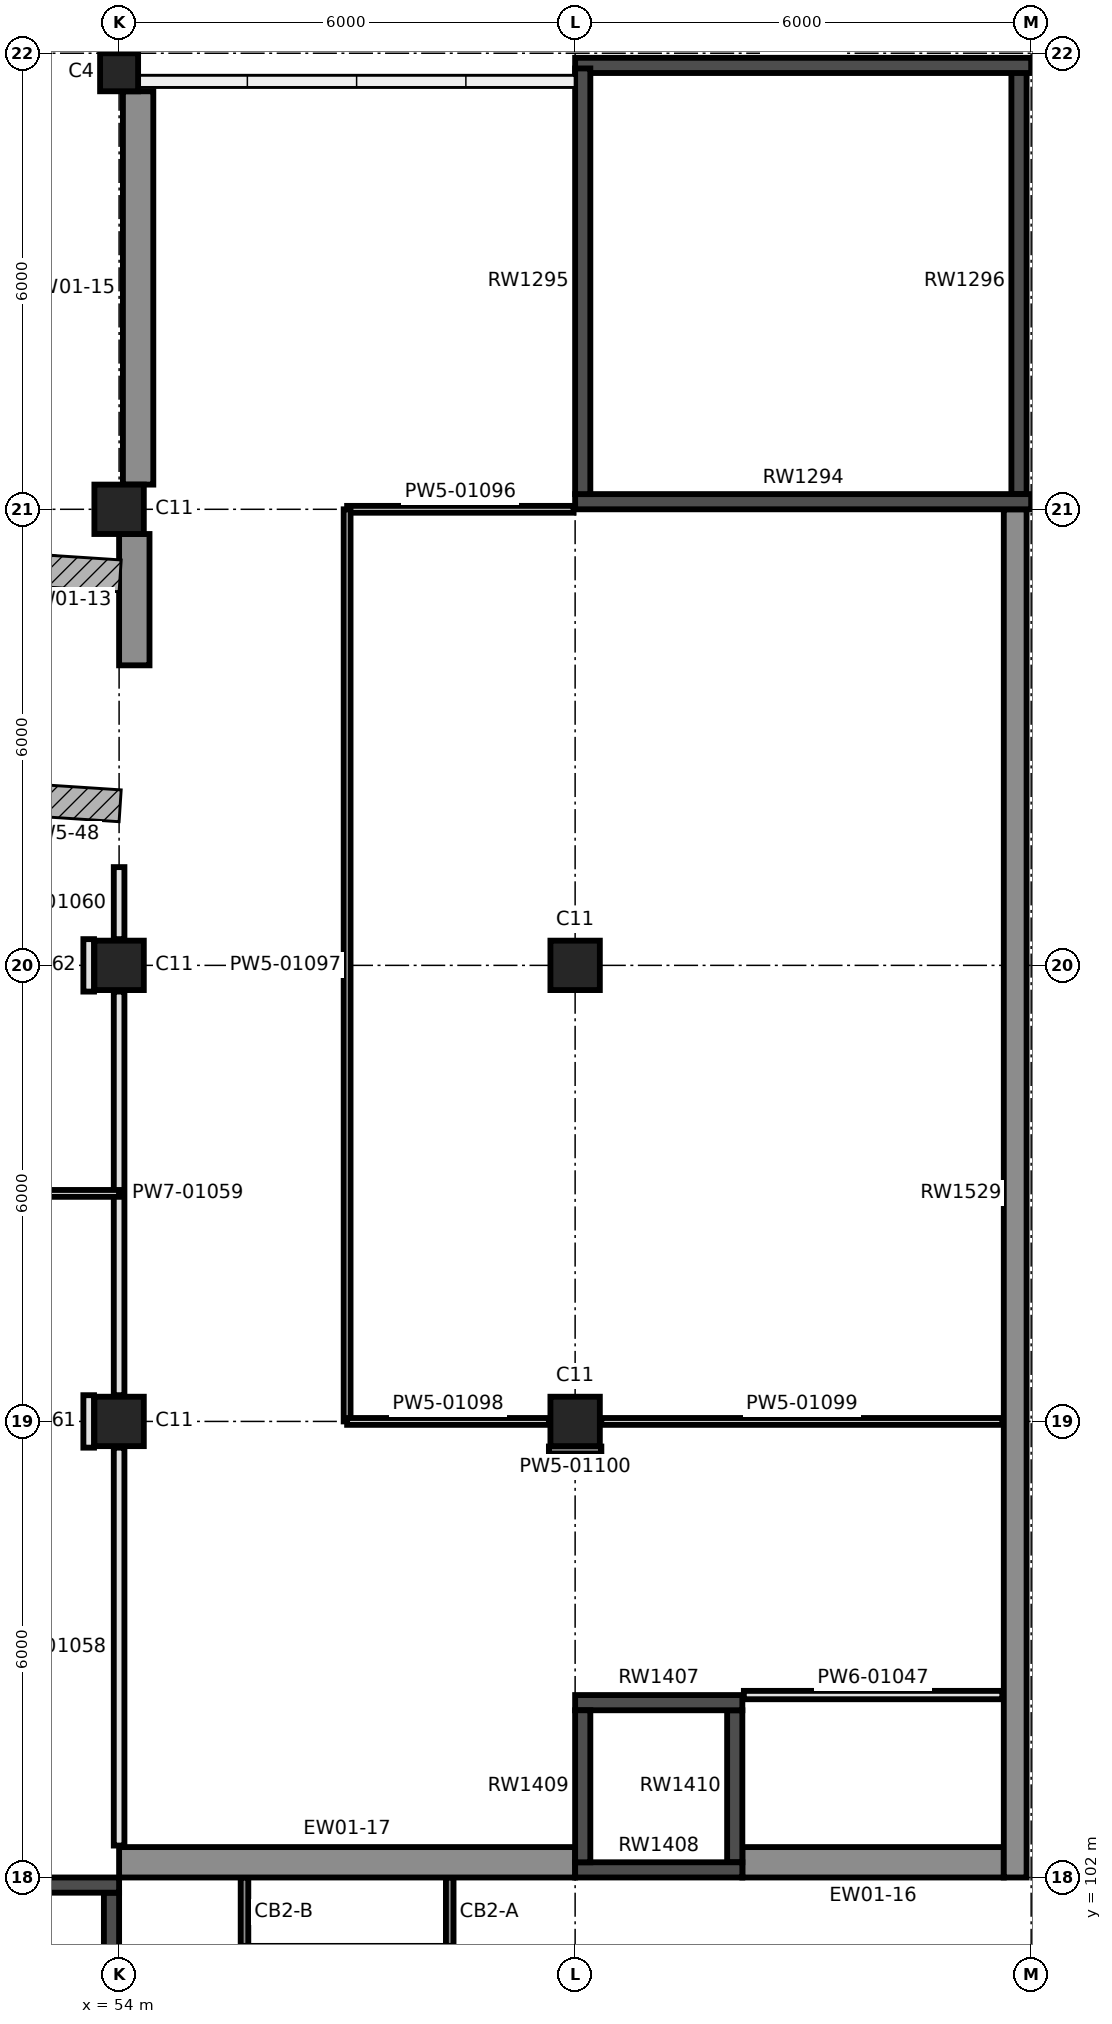
"""IFC4 building model, lengths in metres.
Left out: names, types, materials, properties, quantities, classifications, styles, units other than length and angle.
Written with IfcOpenShell. Run it as: python <this file> out.ifc"""

import sys

from ifc_helpers import new_model, si_unit, direction, frame, frame_2d, origin, origin_2d, place, context, subcontext, project, spatial, polyline, rectangle, outline, extrude, element, fill, save


model = new_model("IFC4")
c1 = context("Model", 3, precision=1e-05, world=origin(), true_north=direction((0.0, 1.0)))
c2 = subcontext(c1, "Body", "Model", "MODEL_VIEW")
j1 = project(units=[si_unit("LENGTHUNIT", "METRE"), si_unit("PLANEANGLEUNIT", "RADIAN")], contexts=[c1])
p1 = place(None, origin())
s1 = spatial("IfcSite", under=j1, at=p1, CompositionType="ELEMENT")
p2 = place(p1, origin())
s2 = spatial("IfcBuilding", under=s1, at=p2, CompositionType="ELEMENT")
p3 = place(p2, frame((0.0, 0.0, 7.0)))
s3 = spatial("IfcBuildingStorey", under=s2, at=p3, CompositionType="ELEMENT", Elevation=7.0)
for number, where, z_axis, x_axis in (
    (1, (54.0, 108.0, 0.0), (0.0, 0.0, 1.0), (1.0, 0.0, 0.0)),
    (2, (60.0, 108.0, 0.0), (0.0, 0.0, 1.0), (1.0, 0.0, 0.0)),
    (3, (54.0, 114.0, 0.0), (0.0, 0.0, 1.0), (1.0, 0.0, 0.0)),
    (4, (60.0, 114.0, 0.0), (0.0, 0.0, 1.0), (1.0, 0.0, 0.0)),
    (5, (54.0, 120.0, 0.0), (0.0, 0.0, 1.0), (1.0, 0.0, 0.0)),
):
    element("IfcColumn", number, at=place(p3, frame(where, z_axis=z_axis, x_axis=x_axis)), inside=s3, PredefinedType="COLUMN", context=c2, shape_type="SweptSolid", body=[
        extrude(rectangle(XDim=0.65, YDim=0.65, at=origin_2d()), origin(), (0.0, 0.0, 1.0), 5.0),
    ])
p4 = place(p3, frame((54.0, 125.75, 0.0), z_axis=(0.0, 0.0, 1.0), x_axis=(1.0, 0.0, 0.0)))
e6 = element("IfcColumn", 6, at=p4, inside=s3, PredefinedType="COLUMN", context=c2, shape_type="SweptSolid", body=[
    extrude(rectangle(XDim=0.5, YDim=0.5, at=origin_2d()), origin(), (0.0, 0.0, 1.0), 5.0),
])
p5 = place(p3, frame((48.0, 101.9, 0.0), z_axis=(0.0, 0.0, 1.0), x_axis=(1.0, 0.0, 0.0)))
e7 = element("IfcWall", 7, at=p5, inside=s3, PredefinedType="SHEAR", context=c2, shape_type="SweptSolid", body=[
    extrude(rectangle(XDim=6.0, YDim=0.2, at=frame_2d((3.0, 0.0))), origin(), (0.0, 0.0, 1.0), 5.0),
])
p6 = place(p5, frame((2.1, 0.0, 0.0)))
e8 = element("IfcOpeningElement", 8, at=p6, cuts=e7, PredefinedType="OPENING", context=c2, shape_type="SweptSolid", body=[
    extrude(rectangle(XDim=1.8, YDim=2.2, at=frame_2d((0.9, 1.1))), frame((0.0, 0.11, 0.0), z_axis=(0.0, -1.0, 0.0), x_axis=(1.0, 0.0, 0.0)), (0.0, 0.0, 1.0), 0.22),
])
p7 = place(p3, frame((53.9, 96.2, 0.0), z_axis=(0.0, 0.0, 1.0), x_axis=(0.0, 1.0, 0.0)))
e9 = element("IfcWall", 9, at=p7, inside=s3, PredefinedType="SHEAR", context=c2, shape_type="SweptSolid", body=[
    extrude(rectangle(XDim=5.6, YDim=0.2, at=frame_2d((2.8, 0.0))), origin(), (0.0, 0.0, 1.0), 5.0),
])
p8 = place(p7, frame((2.55, 0.0, 0.9)))
e10 = element("IfcOpeningElement", 10, at=p8, cuts=e9, PredefinedType="OPENING", context=c2, shape_type="SweptSolid", body=[
    extrude(rectangle(XDim=0.5, YDim=2.1, at=frame_2d((0.25, 1.05))), frame((0.0, 0.11, 0.0), z_axis=(0.0, -1.0, 0.0), x_axis=(1.0, 0.0, 0.0)), (0.0, 0.0, 1.0), 0.22),
])
for number, where, z_axis, x_axis in (
    (11, (60.0, 125.84, 0.0), (0.0, 0.0, 1.0), (1.0, 0.0, 0.0)),
    (12, (60.0, 120.1, 0.0), (0.0, 0.0, 1.0), (1.0, 0.0, 0.0)),
):
    element("IfcWall", number, at=place(p3, frame(where, z_axis=z_axis, x_axis=x_axis)), inside=s3, PredefinedType="SHEAR", context=c2, shape_type="SweptSolid", body=[
        extrude(rectangle(XDim=6.0, YDim=0.2, at=frame_2d((3.0, 0.0))), origin(), (0.0, 0.0, 1.0), 5.0),
    ])
p9 = place(p3, frame((60.1, 120.2, 0.0), z_axis=(0.0, 0.0, 1.0), x_axis=(0.0, 1.0, 0.0)))
e13 = element("IfcWall", 13, at=p9, inside=s3, PredefinedType="SHEAR", context=c2, shape_type="SweptSolid", body=[
    extrude(rectangle(XDim=5.6, YDim=0.2, at=frame_2d((2.8, 0.0))), origin(), (0.0, 0.0, 1.0), 5.0),
])
p10 = place(p9, frame((4.4, 0.0, 0.0)))
e14 = element("IfcOpeningElement", 14, at=p10, cuts=e13, PredefinedType="OPENING", context=c2, shape_type="SweptSolid", body=[
    extrude(rectangle(XDim=1.1, YDim=2.2, at=frame_2d((0.55, 1.1))), frame((0.0, 0.11, 0.0), z_axis=(0.0, -1.0, 0.0), x_axis=(1.0, 0.0, 0.0)), (0.0, 0.0, 1.0), 0.22),
])
p11 = place(p3, frame((65.84, 120.2, 0.0), z_axis=(0.0, 0.0, 1.0), x_axis=(0.0, 1.0, 0.0)))
e15 = element("IfcWall", 15, at=p11, inside=s3, PredefinedType="SHEAR", context=c2, shape_type="SweptSolid", body=[
    extrude(rectangle(XDim=5.6, YDim=0.2, at=frame_2d((2.8, 0.0))), origin(), (0.0, 0.0, 1.0), 5.0),
])
p12 = place(p11, frame((2.55, 0.0, 0.9)))
e16 = element("IfcOpeningElement", 16, at=p12, cuts=e15, PredefinedType="OPENING", context=c2, shape_type="SweptSolid", body=[
    extrude(rectangle(XDim=0.5, YDim=2.1, at=frame_2d((0.25, 1.05))), frame((0.0, 0.11, 0.0), z_axis=(0.0, -1.0, 0.0), x_axis=(1.0, 0.0, 0.0)), (0.0, 0.0, 1.0), 0.22),
])
p13 = place(p3, frame((60.0, 104.3, 0.0), z_axis=(0.0, 0.0, 1.0), x_axis=(1.0, 0.0, 0.0)))
e17 = element("IfcWall", 17, at=p13, inside=s3, PredefinedType="SHEAR", context=c2, shape_type="SweptSolid", body=[
    extrude(rectangle(XDim=2.2, YDim=0.2, at=frame_2d((1.1, 0.0))), origin(), (0.0, 0.0, 1.0), 5.0),
])
p14 = place(p13, frame((0.55, 0.0, 0.0)))
e18 = element("IfcOpeningElement", 18, at=p14, cuts=e17, PredefinedType="OPENING", context=c2, shape_type="SweptSolid", body=[
    extrude(rectangle(XDim=1.1, YDim=2.1, at=frame_2d((0.55, 1.05))), frame((0.0, 0.11, 0.0), z_axis=(0.0, -1.0, 0.0), x_axis=(1.0, 0.0, 0.0)), (0.0, 0.0, 1.0), 0.22),
])
p15 = place(p3, frame((60.0, 102.1, 0.0), z_axis=(0.0, 0.0, 1.0), x_axis=(1.0, 0.0, 0.0)))
e19 = element("IfcWall", 19, at=p15, inside=s3, PredefinedType="SHEAR", context=c2, shape_type="SweptSolid", body=[
    extrude(rectangle(XDim=2.2, YDim=0.2, at=frame_2d((1.1, 0.0))), origin(), (0.0, 0.0, 1.0), 5.0),
])
for number, where, z_axis, x_axis in (
    (20, (60.1, 102.2, 0.0), (0.0, 0.0, 1.0), (0.0, 1.0, 0.0)),
    (21, (62.1, 102.2, 0.0), (0.0, 0.0, 1.0), (0.0, 1.0, 0.0)),
):
    element("IfcWall", number, at=place(p3, frame(where, z_axis=z_axis, x_axis=x_axis)), inside=s3, PredefinedType="SHEAR", context=c2, shape_type="SweptSolid", body=[
        extrude(rectangle(XDim=2.0, YDim=0.2, at=frame_2d((1.0, 0.0))), origin(), (0.0, 0.0, 1.0), 5.0),
    ])
p16 = place(p3, frame((65.79, 102.0, 0.0), z_axis=(0.0, 0.0, 1.0), x_axis=(0.0, 1.0, 0.0)))
e22 = element("IfcWall", 22, at=p16, inside=s3, PredefinedType="SOLIDWALL", context=c2, shape_type="SweptSolid", body=[
    extrude(rectangle(XDim=18.0, YDim=0.3, at=frame_2d((9.0, 0.0))), origin(), (0.0, 0.0, 1.0), 5.0),
])
p17 = place(p3, frame((54.0, 115.89, 0.0), z_axis=(-0.054899407289, -0.836965590728, 0.544494862249), x_axis=(-0.997853997628, 0.065478224383, 3.9353391e-05)))
e23 = element("IfcWall", 23, at=p17, inside=s3, PredefinedType="SOLIDWALL", context=c2, shape_type="SweptSolid", body=[
    extrude(outline(polyline([(0.0, 0.0), (1.322, 0.0), (1.125, -5.544), (0.198, -5.544), (0.0, 0.0)])), origin(), (-7.539e-05, 0.544, 0.839), 0.596),
])
p18 = place(p3, frame((54.2, 117.947, 0.0), z_axis=(0.0, 0.0, 1.0), x_axis=(0.0, 1.0, 0.0)))
e24 = element("IfcWall", 24, at=p18, inside=s3, PredefinedType="SOLIDWALL", context=c2, shape_type="SweptSolid", body=[
    extrude(rectangle(XDim=1.728, YDim=0.4, at=frame_2d((0.864, 0.0))), origin(), (0.0, 0.0, 1.0), 4.05),
])
p19 = place(p3, frame((54.25, 120.325, 0.0), z_axis=(0.0, 0.0, 1.0), x_axis=(0.0, 1.0, 0.0)))
e25 = element("IfcWall", 25, at=p19, inside=s3, PredefinedType="SOLIDWALL", context=c2, shape_type="SweptSolid", body=[
    extrude(rectangle(XDim=5.175, YDim=0.4, at=frame_2d((2.587, 0.0))), origin(), (0.0, 0.0, 1.0), 3.95),
])
p20 = place(p3, frame((65.64, 102.2, 0.0), z_axis=(0.0, 0.0, 1.0), x_axis=(-1.0, 0.0, 0.0)))
e26 = element("IfcWall", 26, at=p20, inside=s3, PredefinedType="SOLIDWALL", context=c2, shape_type="SweptSolid", body=[
    extrude(rectangle(XDim=3.44, YDim=0.4, at=frame_2d((1.72, 0.0))), origin(), (0.0, 0.0, 1.0), 4.05),
])
p21 = place(p20, frame((1.045, 0.0, 0.9)))
e27 = element("IfcOpeningElement", 27, at=p21, cuts=e26, PredefinedType="OPENING", context=c2, shape_type="SweptSolid", body=[
    extrude(rectangle(XDim=1.35, YDim=2.95, at=frame_2d((0.675, 1.475))), frame((0.0, 0.21, 0.0), z_axis=(0.0, -1.0, 0.0), x_axis=(1.0, 0.0, 0.0)), (0.0, 0.0, 1.0), 0.42),
])
p22 = place(p3, frame((60.0, 102.2, 0.0), z_axis=(0.0, 0.0, 1.0), x_axis=(-1.0, 0.0, 0.0)))
e28 = element("IfcWall", 28, at=p22, inside=s3, PredefinedType="SOLIDWALL", context=c2, shape_type="SweptSolid", body=[
    extrude(rectangle(XDim=6.0, YDim=0.4, at=frame_2d((3.0, 0.0))), origin(), (0.0, 0.0, 1.0), 4.05),
])
p23 = place(p22, frame((1.8, 0.0, 0.9)))
e29 = element("IfcOpeningElement", 29, at=p23, cuts=e28, PredefinedType="OPENING", context=c2, shape_type="SweptSolid", body=[
    extrude(rectangle(XDim=2.4, YDim=2.95, at=frame_2d((1.2, 1.475))), frame((0.0, 0.21, 0.0), z_axis=(0.0, -1.0, 0.0), x_axis=(1.0, 0.0, 0.0)), (0.0, 0.0, 1.0), 0.42),
])
for number, where, z_axis, x_axis in (
    (30, (58.35, 102.0, 0.0), (0.0, 0.0, 1.0), (0.0, -1.0, 0.0)),
    (31, (55.65, 102.0, 0.0), (0.0, 0.0, 1.0), (0.0, -1.0, 0.0)),
):
    element("IfcWall", number, at=place(p3, frame(where, z_axis=z_axis, x_axis=x_axis)), inside=s3, PredefinedType="SOLIDWALL", context=c2, shape_type="SweptSolid", body=[
        extrude(rectangle(XDim=0.9, YDim=0.1, at=frame_2d((0.45, 0.0))), origin(), (0.0, 0.0, 1.0), 4.0),
    ])
p24 = place(p3, frame((62.22, 104.4, 0.0), z_axis=(0.0, 0.0, 1.0), x_axis=(1.0, 0.0, 0.0)))
e32 = element("IfcWall", 32, at=p24, inside=s3, PredefinedType="PARTITIONING", context=c2, shape_type="SweptSolid", body=[
    extrude(rectangle(XDim=3.4, YDim=0.11, at=frame_2d((1.7, 0.0))), origin(), (0.0, 0.0, 1.0), 4.75),
])
p25 = place(p24, frame((1.53, 0.0, 0.0)))
e33 = element("IfcOpeningElement", 33, at=p25, cuts=e32, PredefinedType="OPENING", context=c2, shape_type="SweptSolid", body=[
    extrude(rectangle(XDim=0.75, YDim=2.04, at=frame_2d((0.375, 1.02))), frame((0.0, 0.065, 0.0), z_axis=(0.0, -1.0, 0.0), x_axis=(1.0, 0.0, 0.0)), (0.0, 0.0, 1.0), 0.13),
])
p26 = place(p3, frame((54.0, 102.42, 0.0), z_axis=(0.0, 0.0, 1.0), x_axis=(0.0, 1.0, 0.0)))
e34 = element("IfcWall", 34, at=p26, inside=s3, PredefinedType="PARTITIONING", context=c2, shape_type="SweptSolid", body=[
    extrude(rectangle(XDim=5.235, YDim=0.14, at=frame_2d((2.618, 0.0))), origin(), (0.0, 0.0, 1.0), 4.15),
])
p27 = place(p26, frame((1.63, 0.0, 0.0)))
e35 = element("IfcOpeningElement", 35, at=p27, cuts=e34, PredefinedType="OPENING", context=c2, shape_type="SweptSolid", body=[
    extrude(rectangle(XDim=1.8, YDim=2.1, at=frame_2d((0.9, 1.05))), frame((0.0, 0.08, 0.0), z_axis=(0.0, -1.0, 0.0), x_axis=(1.0, 0.0, 0.0)), (0.0, 0.0, 1.0), 0.16),
])
p28 = place(p3, frame((54.0, 108.345, 0.0), z_axis=(0.0, 0.0, 1.0), x_axis=(0.0, 1.0, 0.0)))
e36 = element("IfcWall", 36, at=p28, inside=s3, PredefinedType="PARTITIONING", context=c2, shape_type="SweptSolid", body=[
    extrude(rectangle(XDim=5.31, YDim=0.14, at=frame_2d((2.655, 0.0))), origin(), (0.0, 0.0, 1.0), 4.05),
])
p29 = place(p28, frame((0.205, 0.0, 0.0)))
e37 = element("IfcOpeningElement", 37, at=p29, cuts=e36, PredefinedType="OPENING", context=c2, shape_type="SweptSolid", body=[
    extrude(rectangle(XDim=1.8, YDim=2.1, at=frame_2d((0.9, 1.05))), frame((0.0, 0.08, 0.0), z_axis=(0.0, -1.0, 0.0), x_axis=(1.0, 0.0, 0.0)), (0.0, 0.0, 1.0), 0.16),
])
p30 = place(p3, frame((54.0, 114.345, 0.0), z_axis=(0.0, 0.0, 1.0), x_axis=(0.0, 1.0, 0.0)))
e38 = element("IfcWall", 38, at=p30, inside=s3, PredefinedType="PARTITIONING", context=c2, shape_type="SweptSolid", body=[
    extrude(rectangle(XDim=0.948, YDim=0.14, at=frame_2d((0.474, 0.0))), origin(), (0.0, 0.0, 1.0), 4.05),
])
p31 = place(p3, frame((53.6, 107.655, 0.0), z_axis=(0.0, 0.0, 1.0), x_axis=(0.0, 1.0, 0.0)))
e39 = element("IfcWall", 39, at=p31, inside=s3, PredefinedType="PARTITIONING", context=c2, shape_type="SweptSolid", body=[
    extrude(rectangle(XDim=0.69, YDim=0.14, at=frame_2d((0.345, 0.0))), origin(), (0.0, 0.0, 1.0), 4.05),
])
p32 = place(p3, frame((53.6, 113.655, 0.0), z_axis=(0.0, 0.0, 1.0), x_axis=(0.0, 1.0, 0.0)))
e40 = element("IfcWall", 40, at=p32, inside=s3, PredefinedType="PARTITIONING", context=c2, shape_type="SweptSolid", body=[
    extrude(rectangle(XDim=0.69, YDim=0.14, at=frame_2d((0.345, 0.0))), origin(), (0.0, 0.0, 1.0), 4.75),
])
p33 = place(p3, frame((48.0, 111.0, 0.0), z_axis=(0.0, 0.0, 1.0), x_axis=(1.0, 0.0, 0.0)))
e41 = element("IfcWall", 41, at=p33, inside=s3, PredefinedType="PARTITIONING", context=c2, shape_type="SweptSolid", body=[
    extrude(rectangle(XDim=6.0, YDim=0.09, at=frame_2d((3.0, 0.0))), origin(), (0.0, 0.0, 1.0), 4.75),
])
p34 = place(p33, frame((2.55, 0.0, 0.0)))
e42 = element("IfcOpeningElement", 42, at=p34, cuts=e41, PredefinedType="OPENING", context=c2, shape_type="SweptSolid", body=[
    extrude(rectangle(XDim=0.92, YDim=2.04, at=frame_2d((0.46, 1.02))), frame((0.0, 0.055, 0.0), z_axis=(0.0, -1.0, 0.0), x_axis=(1.0, 0.0, 0.0)), (0.0, 0.0, 1.0), 0.11),
])
p35 = place(p3, frame((57.0, 120.0, 0.0), z_axis=(0.0, 0.0, 1.0), x_axis=(1.0, 0.0, 0.0)))
e43 = element("IfcWall", 43, at=p35, inside=s3, PredefinedType="PARTITIONING", context=c2, shape_type="SweptSolid", body=[
    extrude(rectangle(XDim=2.98, YDim=0.09, at=frame_2d((1.49, 0.0))), origin(), (0.0, 0.0, 1.0), 4.15),
])
p36 = place(p3, frame((57.0, 108.0, 0.0), z_axis=(0.0, 0.0, 1.0), x_axis=(0.0, 1.0, 0.0)))
e44 = element("IfcWall", 44, at=p36, inside=s3, PredefinedType="PARTITIONING", context=c2, shape_type="SweptSolid", body=[
    extrude(rectangle(XDim=12.0, YDim=0.09, at=frame_2d((6.0, 0.0))), origin(), (0.0, 0.0, 1.0), 4.15),
])
p37 = place(p36, frame((5.05, 0.0, 0.0)))
e45 = element("IfcOpeningElement", 45, at=p37, cuts=e44, PredefinedType="OPENING", context=c2, shape_type="SweptSolid", body=[
    extrude(rectangle(XDim=1.8, YDim=2.1, at=frame_2d((0.9, 1.05))), frame((0.0, 0.055, 0.0), z_axis=(0.0, -1.0, 0.0), x_axis=(1.0, 0.0, 0.0)), (0.0, 0.0, 1.0), 0.11),
])
p38 = place(p3, frame((57.0, 108.0, 0.0), z_axis=(0.0, 0.0, 1.0), x_axis=(1.0, 0.0, 0.0)))
e46 = element("IfcWall", 46, at=p38, inside=s3, PredefinedType="PARTITIONING", context=c2, shape_type="SweptSolid", body=[
    extrude(rectangle(XDim=2.655, YDim=0.09, at=frame_2d((1.328, 0.0))), origin(), (0.0, 0.0, 1.0), 4.15),
])
p39 = place(p3, frame((60.345, 108.0, 0.0), z_axis=(0.0, 0.0, 1.0), x_axis=(1.0, 0.0, 0.0)))
e47 = element("IfcWall", 47, at=p39, inside=s3, PredefinedType="PARTITIONING", context=c2, shape_type="SweptSolid", body=[
    extrude(rectangle(XDim=5.275, YDim=0.09, at=frame_2d((2.638, 0.0))), origin(), (0.0, 0.0, 1.0), 4.15),
])
p40 = place(p3, frame((59.655, 107.625, 0.0), z_axis=(0.0, 0.0, 1.0), x_axis=(1.0, 0.0, 0.0)))
e48 = element("IfcWall", 48, at=p40, inside=s3, PredefinedType="PARTITIONING", context=c2, shape_type="SweptSolid", body=[
    extrude(rectangle(XDim=0.69, YDim=0.09, at=frame_2d((0.345, 0.0))), origin(), (0.0, 0.0, 1.0), 4.15),
])
p41 = place(p21, origin())
e49 = element("IfcWindow", 49, at=p41, inside=s3, PartitioningType="SINGLE_PANEL", PredefinedType="WINDOW", context=c2, shape_type="SweptSolid", body=[
    extrude(rectangle(XDim=1.35, YDim=2.95, at=frame_2d((0.675, 1.475))), frame((0.0, 0.03, 0.0), z_axis=(0.0, -1.0, 0.0), x_axis=(1.0, 0.0, 0.0)), (0.0, 0.0, 1.0), 0.06),
])
fill(e27, e49)
p42 = place(p12, origin())
e50 = element("IfcWindow", 50, at=p42, inside=s3, PartitioningType="SINGLE_PANEL", PredefinedType="WINDOW", context=c2, shape_type="SweptSolid", body=[
    extrude(rectangle(XDim=0.5, YDim=2.1, at=frame_2d((0.25, 1.05))), frame((0.0, 0.03, 0.0), z_axis=(0.0, -1.0, 0.0), x_axis=(1.0, 0.0, 0.0)), (0.0, 0.0, 1.0), 0.06),
])
fill(e16, e50)
p43 = place(p23, origin())
e51 = element("IfcWindow", 51, at=p43, inside=s3, PartitioningType="SINGLE_PANEL", PredefinedType="WINDOW", context=c2, shape_type="SweptSolid", body=[
    extrude(rectangle(XDim=2.4, YDim=2.95, at=frame_2d((1.2, 1.475))), frame((0.0, 0.03, 0.0), z_axis=(0.0, -1.0, 0.0), x_axis=(1.0, 0.0, 0.0)), (0.0, 0.0, 1.0), 0.06),
])
fill(e29, e51)
p44 = place(p37, frame((1.8, 0.0, 0.0), z_axis=(0.0, 0.0, 1.0), x_axis=(-1.0, 0.0, 0.0)))
e52 = element("IfcDoor", 52, at=p44, inside=s3, OperationType="DOUBLE_DOOR_SINGLE_SWING", PredefinedType="DOOR", context=c2, shape_type="SweptSolid", body=[
    extrude(rectangle(XDim=1.8, YDim=2.1, at=frame_2d((0.9, 1.05))), frame((0.0, 0.025, 0.0), z_axis=(0.0, -1.0, 0.0), x_axis=(1.0, 0.0, 0.0)), (0.0, 0.0, 1.0), 0.05),
])
fill(e45, e52)
p45 = place(p10, frame((1.1, 0.0, 0.0), z_axis=(0.0, 0.0, 1.0), x_axis=(-1.0, 0.0, 0.0)))
e53 = element("IfcDoor", 53, at=p45, inside=s3, OperationType="SINGLE_SWING_RIGHT", PredefinedType="DOOR", context=c2, shape_type="SweptSolid", body=[
    extrude(rectangle(XDim=1.1, YDim=2.2, at=frame_2d((0.55, 1.1))), frame((0.0, 0.025, 0.0), z_axis=(0.0, -1.0, 0.0), x_axis=(1.0, 0.0, 0.0)), (0.0, 0.0, 1.0), 0.05),
])
fill(e14, e53)
p46 = place(p25, frame((0.75, 0.0, 0.0), z_axis=(0.0, 0.0, 1.0), x_axis=(-1.0, 0.0, 0.0)))
e54 = element("IfcDoor", 54, at=p46, inside=s3, OperationType="SINGLE_SWING_RIGHT", PredefinedType="DOOR", context=c2, shape_type="SweptSolid", body=[
    extrude(rectangle(XDim=0.75, YDim=2.04, at=frame_2d((0.375, 1.02))), frame((0.0, 0.025, 0.0), z_axis=(0.0, -1.0, 0.0), x_axis=(1.0, 0.0, 0.0)), (0.0, 0.0, 1.0), 0.05),
])
fill(e33, e54)
p47 = place(p27, origin())
e55 = element("IfcDoor", 55, at=p47, inside=s3, OperationType="DOUBLE_DOOR_SINGLE_SWING", PredefinedType="DOOR", context=c2, shape_type="SweptSolid", body=[
    extrude(rectangle(XDim=1.8, YDim=2.1, at=frame_2d((0.9, 1.05))), frame((0.0, 0.025, 0.0), z_axis=(0.0, -1.0, 0.0), x_axis=(1.0, 0.0, 0.0)), (0.0, 0.0, 1.0), 0.05),
])
fill(e35, e55)
p48 = place(p29, origin())
e56 = element("IfcDoor", 56, at=p48, inside=s3, OperationType="DOUBLE_DOOR_SINGLE_SWING", PredefinedType="DOOR", context=c2, shape_type="SweptSolid", body=[
    extrude(rectangle(XDim=1.8, YDim=2.1, at=frame_2d((0.9, 1.05))), frame((0.0, 0.025, 0.0), z_axis=(0.0, -1.0, 0.0), x_axis=(1.0, 0.0, 0.0)), (0.0, 0.0, 1.0), 0.05),
])
fill(e37, e56)
p49 = place(p14, origin())
e57 = element("IfcDoor", 57, at=p49, inside=s3, OperationType="DOUBLE_DOOR_SLIDING", PredefinedType="DOOR", context=c2, shape_type="SweptSolid", body=[
    extrude(rectangle(XDim=1.1, YDim=2.1, at=frame_2d((0.55, 1.05))), frame((0.0, 0.025, 0.0), z_axis=(0.0, -1.0, 0.0), x_axis=(1.0, 0.0, 0.0)), (0.0, 0.0, 1.0), 0.05),
])
fill(e18, e57)
save(model, sys.argv[1])
